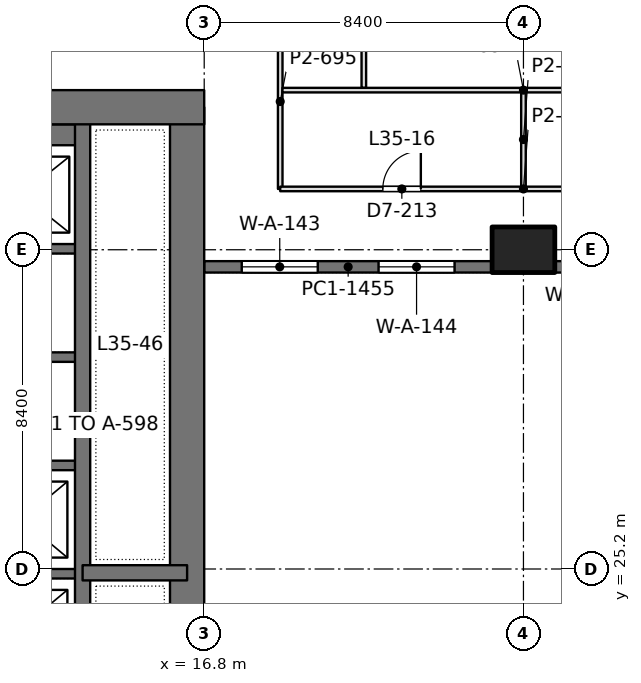
"""IFC4 building model, lengths in metres.
Left out: names, types, materials, properties, quantities, classifications, styles, units other than length and angle.
Written with IfcOpenShell. Run it as: python <this file> out.ifc"""

import sys

from ifc_helpers import new_model, si_unit, direction, frame, frame_2d, origin, origin_2d, place, context, subcontext, project, spatial, rectangle, extrude, element, fill, save


model = new_model("IFC4")
c1 = context("Model", 3, precision=1e-05, world=origin(), true_north=direction((0.0, 1.0)))
c2 = subcontext(c1, "Body", "Model", "MODEL_VIEW")
j1 = project(units=[si_unit("LENGTHUNIT", "METRE"), si_unit("PLANEANGLEUNIT", "RADIAN")], contexts=[c1])
p1 = place(None, origin())
s1 = spatial("IfcSite", under=j1, at=p1, CompositionType="ELEMENT")
p2 = place(p1, origin())
s2 = spatial("IfcBuilding", under=s1, at=p2, CompositionType="ELEMENT")
p3 = place(p2, frame((0.0, 0.0, 155.4)))
s3 = spatial("IfcBuildingStorey", under=s2, at=p3, CompositionType="ELEMENT", Elevation=155.4)
p4 = place(p3, frame((25.2, 33.6, 0.0), z_axis=(0.0, 0.0, 1.0), x_axis=(1.0, 0.0, 0.0)))
e1 = element("IfcColumn", 1, at=p4, inside=s3, PredefinedType="COLUMN", context=c2, shape_type="SweptSolid", body=[
    extrude(rectangle(XDim=1.65, YDim=1.2, at=origin_2d()), origin(), (0.0, 0.0, 1.0), 4.2),
])
p5 = place(p3, frame((-1.2, 37.35, 0.0), z_axis=(0.0, 0.0, 1.0), x_axis=(1.0, 0.0, 0.0)))
e2 = element("IfcWall", 2, at=p5, inside=s3, PredefinedType="SHEAR", context=c2, shape_type="SweptSolid", body=[
    extrude(rectangle(XDim=18.0, YDim=0.9, at=frame_2d((9.0, 0.0))), origin(), (0.0, 0.0, 1.0), 4.2),
])
p6 = place(p5, frame((8.95, 0.0, 0.0)))
e3 = element("IfcOpeningElement", 3, at=p6, cuts=e2, PredefinedType="OPENING", context=c2, shape_type="SweptSolid", body=[
    extrude(rectangle(XDim=1.8, YDim=2.4, at=frame_2d((0.9, 1.2))), frame((0.0, 0.46, 0.0), z_axis=(0.0, -1.0, 0.0), x_axis=(1.0, 0.0, 0.0)), (0.0, 0.0, 1.0), 0.92),
])
p7 = place(p3, frame((16.35, 22.1, 0.0), z_axis=(0.0, 0.0, 1.0), x_axis=(0.0, 1.0, 0.0)))
e4 = element("IfcWall", 4, at=p7, inside=s3, PredefinedType="SHEAR", context=c2, shape_type="SweptSolid", body=[
    extrude(rectangle(XDim=15.25, YDim=0.9, at=frame_2d((7.625, 0.0))), origin(), (0.0, 0.0, 1.0), 4.2),
])
p8 = place(p3, frame((13.6, 22.225, 0.0), z_axis=(0.0, 0.0, 1.0), x_axis=(0.0, 1.0, 0.0)))
e5 = element("IfcWall", 5, at=p8, inside=s3, PredefinedType="SHEAR", context=c2, shape_type="SweptSolid", body=[
    extrude(rectangle(XDim=15.125, YDim=0.4, at=frame_2d((7.562, 0.0))), origin(), (0.0, 0.0, 1.0), 4.2),
])
p9 = place(p3, frame((13.6, 25.1, 0.0), z_axis=(0.0, 0.0, 1.0), x_axis=(1.0, 0.0, 0.0)))
e6 = element("IfcWall", 6, at=p9, inside=s3, PredefinedType="SHEAR", context=c2, shape_type="SweptSolid", body=[
    extrude(rectangle(XDim=2.75, YDim=0.4, at=frame_2d((1.375, 0.0))), origin(), (0.0, 0.0, 1.0), 4.2),
])
for number, where, z_axis, x_axis in (
    (7, (10.4, 25.075, 0.0), (0.0, 0.0, 1.0), (1.0, 0.0, 0.0)),
    (8, (10.4, 27.925, 0.0), (0.0, 0.0, 1.0), (1.0, 0.0, 0.0)),
    (9, (10.4, 30.775, 0.0), (0.0, 0.0, 1.0), (1.0, 0.0, 0.0)),
    (10, (10.4, 33.625, 0.0), (0.0, 0.0, 1.0), (1.0, 0.0, 0.0)),
):
    element("IfcWall", number, at=place(p3, frame(where, z_axis=z_axis, x_axis=x_axis)), inside=s3, PredefinedType="SHEAR", context=c2, shape_type="SweptSolid", body=[
        extrude(rectangle(XDim=3.2, YDim=0.25, at=frame_2d((1.6, 0.0))), origin(), (0.0, 0.0, 1.0), 4.2),
    ])
p10 = place(p3, frame((10.4, 36.625, 0.0), z_axis=(0.0, 0.0, 1.0), x_axis=(1.0, 0.0, 0.0)))
e11 = element("IfcWall", 11, at=p10, inside=s3, PredefinedType="SHEAR", context=c2, shape_type="SweptSolid", body=[
    extrude(rectangle(XDim=3.2, YDim=0.55, at=frame_2d((1.6, 0.0))), origin(), (0.0, 0.0, 1.0), 4.2),
])
p11 = place(p3, frame((16.8, 33.15, 0.0), z_axis=(0.0, 0.0, 1.0), x_axis=(1.0, 0.0, 0.0)))
e12 = element("IfcWall", 12, at=p11, inside=s3, PredefinedType="SOLIDWALL", context=c2, shape_type="SweptSolid", body=[
    extrude(rectangle(XDim=7.575, YDim=0.3, at=frame_2d((3.788, 0.0))), origin(), (0.0, 0.0, 1.0), 4.05),
])
p12 = place(p11, frame((0.988, 0.0, 0.1)))
e13 = element("IfcOpeningElement", 13, at=p12, cuts=e12, PredefinedType="OPENING", context=c2, shape_type="SweptSolid", body=[
    extrude(rectangle(XDim=2.0, YDim=3.0, at=frame_2d((1.0, 1.5))), frame((0.0, 0.16, 0.0), z_axis=(0.0, -1.0, 0.0), x_axis=(1.0, 0.0, 0.0)), (0.0, 0.0, 1.0), 0.32),
])
p13 = place(p11, frame((4.587, 0.0, 0.1)))
e14 = element("IfcOpeningElement", 14, at=p13, cuts=e12, PredefinedType="OPENING", context=c2, shape_type="SweptSolid", body=[
    extrude(rectangle(XDim=2.0, YDim=3.0, at=frame_2d((1.0, 1.5))), frame((0.0, 0.16, 0.0), z_axis=(0.0, -1.0, 0.0), x_axis=(1.0, 0.0, 0.0)), (0.0, 0.0, 1.0), 0.32),
])
p14 = place(p3, frame((26.025, 33.15, 0.0), z_axis=(0.0, 0.0, 1.0), x_axis=(1.0, 0.0, 0.0)))
e15 = element("IfcWall", 15, at=p14, inside=s3, PredefinedType="SOLIDWALL", context=c2, shape_type="SweptSolid", body=[
    extrude(rectangle(XDim=7.575, YDim=0.3, at=frame_2d((3.788, 0.0))), origin(), (0.0, 0.0, 1.0), 4.05),
])
p15 = place(p14, frame((0.587, 0.0, 0.1)))
e16 = element("IfcOpeningElement", 16, at=p15, cuts=e15, PredefinedType="OPENING", context=c2, shape_type="SweptSolid", body=[
    extrude(rectangle(XDim=2.0, YDim=3.0, at=frame_2d((1.0, 1.5))), frame((0.0, 0.16, 0.0), z_axis=(0.0, -1.0, 0.0), x_axis=(1.0, 0.0, 0.0)), (0.0, 0.0, 1.0), 0.32),
])
p16 = place(p14, frame((4.188, 0.0, 0.1)))
e17 = element("IfcOpeningElement", 17, at=p16, cuts=e15, PredefinedType="OPENING", context=c2, shape_type="SweptSolid", body=[
    extrude(rectangle(XDim=2.0, YDim=3.0, at=frame_2d((1.0, 1.5))), frame((0.0, 0.16, 0.0), z_axis=(0.0, -1.0, 0.0), x_axis=(1.0, 0.0, 0.0)), (0.0, 0.0, 1.0), 0.32),
])
p17 = place(p3, frame((21.0, 37.858, 0.0), z_axis=(0.0, 0.0, 1.0), x_axis=(0.0, 1.0, 0.0)))
e18 = element("IfcWall", 18, at=p17, inside=s3, PredefinedType="PARTITIONING", context=c2, shape_type="SweptSolid", body=[
    extrude(rectangle(XDim=10.644, YDim=0.12, at=frame_2d((5.322, 0.0))), origin(), (0.0, 0.0, 1.0), 3.55),
])
p18 = place(p3, frame((18.8, 35.2, 0.0), z_axis=(0.0, 0.0, 1.0), x_axis=(0.0, 1.0, 0.0)))
e19 = element("IfcWall", 19, at=p18, inside=s3, PredefinedType="PARTITIONING", context=c2, shape_type="SweptSolid", body=[
    extrude(rectangle(XDim=4.6, YDim=0.12, at=frame_2d((2.3, 0.0))), origin(), (0.0, 0.0, 1.0), 4.05),
])
p19 = place(p3, frame((25.2, 35.258, 0.0), z_axis=(0.0, 0.0, 1.0), x_axis=(0.0, 1.0, 0.0)))
e20 = element("IfcWall", 20, at=p19, inside=s3, PredefinedType="PARTITIONING", context=c2, shape_type="SweptSolid", body=[
    extrude(rectangle(XDim=2.484, YDim=0.12, at=frame_2d((1.242, 0.0))), origin(), (0.0, 0.0, 1.0), 3.55),
])
p20 = place(p3, frame((18.8, 35.2, 0.0), z_axis=(0.0, 0.0, 1.0), x_axis=(1.0, 0.0, 0.0)))
e21 = element("IfcWall", 21, at=p20, inside=s3, PredefinedType="PARTITIONING", context=c2, shape_type="SweptSolid", body=[
    extrude(rectangle(XDim=12.8, YDim=0.12, at=frame_2d((6.4, 0.0))), origin(), (0.0, 0.0, 1.0), 3.55),
])
p21 = place(p20, frame((2.7, 0.0, 0.0)))
e22 = element("IfcOpeningElement", 22, at=p21, cuts=e21, PredefinedType="OPENING", context=c2, shape_type="SweptSolid", body=[
    extrude(rectangle(XDim=1.0, YDim=2.4, at=frame_2d((0.5, 1.2))), frame((0.0, 0.07, 0.0), z_axis=(0.0, -1.0, 0.0), x_axis=(1.0, 0.0, 0.0)), (0.0, 0.0, 1.0), 0.14),
])
p22 = place(p20, frame((9.1, 0.0, 0.0)))
e23 = element("IfcOpeningElement", 23, at=p22, cuts=e21, PredefinedType="OPENING", context=c2, shape_type="SweptSolid", body=[
    extrude(rectangle(XDim=1.0, YDim=2.4, at=frame_2d((0.5, 1.2))), frame((0.0, 0.07, 0.0), z_axis=(0.0, -1.0, 0.0), x_axis=(1.0, 0.0, 0.0)), (0.0, 0.0, 1.0), 0.14),
])
p23 = place(p3, frame((18.858, 37.8, 0.0), z_axis=(0.0, 0.0, 1.0), x_axis=(1.0, 0.0, 0.0)))
e24 = element("IfcWall", 24, at=p23, inside=s3, PredefinedType="PARTITIONING", context=c2, shape_type="SweptSolid", body=[
    extrude(rectangle(XDim=12.684, YDim=0.12, at=frame_2d((6.342, 0.0))), origin(), (0.0, 0.0, 1.0), 3.55),
])
p24 = place(p12, origin())
e25 = element("IfcWindow", 25, at=p24, inside=s3, PartitioningType="SINGLE_PANEL", PredefinedType="WINDOW", context=c2, shape_type="SweptSolid", body=[
    extrude(rectangle(XDim=2.0, YDim=3.0, at=frame_2d((1.0, 1.5))), frame((0.0, 0.03, 0.0), z_axis=(0.0, -1.0, 0.0), x_axis=(1.0, 0.0, 0.0)), (0.0, 0.0, 1.0), 0.06),
])
fill(e13, e25)
p25 = place(p13, origin())
e26 = element("IfcWindow", 26, at=p25, inside=s3, PartitioningType="SINGLE_PANEL", PredefinedType="WINDOW", context=c2, shape_type="SweptSolid", body=[
    extrude(rectangle(XDim=2.0, YDim=3.0, at=frame_2d((1.0, 1.5))), frame((0.0, 0.03, 0.0), z_axis=(0.0, -1.0, 0.0), x_axis=(1.0, 0.0, 0.0)), (0.0, 0.0, 1.0), 0.06),
])
fill(e14, e26)
p26 = place(p21, origin())
e27 = element("IfcDoor", 27, at=p26, inside=s3, OperationType="SINGLE_SWING_RIGHT", PredefinedType="DOOR", context=c2, shape_type="SweptSolid", body=[
    extrude(rectangle(XDim=1.0, YDim=2.4, at=frame_2d((0.5, 1.2))), frame((0.0, 0.025, 0.0), z_axis=(0.0, -1.0, 0.0), x_axis=(1.0, 0.0, 0.0)), (0.0, 0.0, 1.0), 0.05),
])
fill(e22, e27)
save(model, sys.argv[1])
